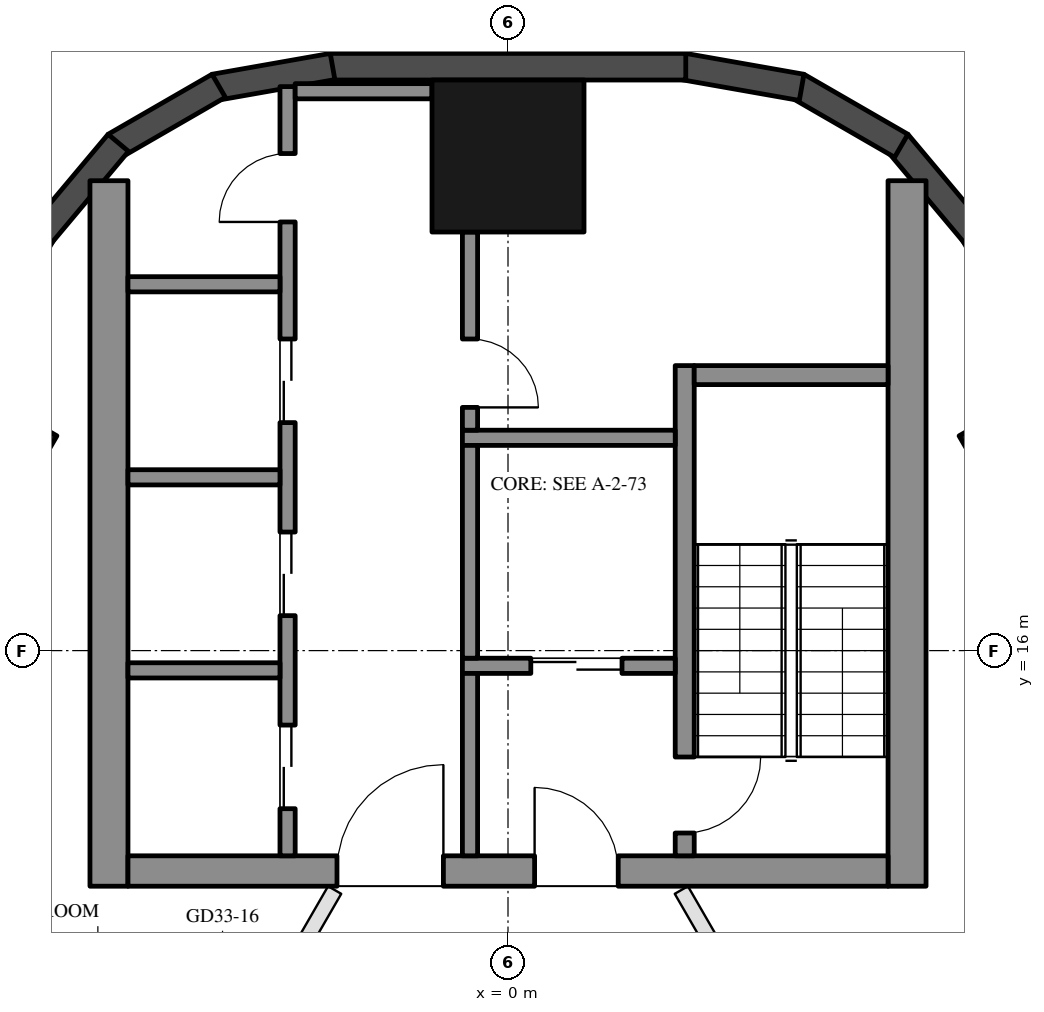
"""IFC4 building model, lengths in metres.
Left out: names, types, materials, properties, quantities, classifications, styles, units other than length and angle.
Written with IfcOpenShell. Run it as: python <this file> out.ifc"""

import sys

from ifc_helpers import new_model, si_unit, direction, frame, frame_2d, origin, origin_2d, place, context, subcontext, project, spatial, rectangle, hollow_rectangle, extrude, boolean, halfspace, element, fill, save


model = new_model("IFC4")
c1 = context("Model", 3, precision=1e-05, world=origin(), true_north=direction((0.0, 1.0)))
c2 = subcontext(c1, "Body", "Model", "MODEL_VIEW")
j1 = project(units=[si_unit("LENGTHUNIT", "METRE"), si_unit("PLANEANGLEUNIT", "RADIAN")], contexts=[c1])
p1 = place(None, origin())
s1 = spatial("IfcSite", under=j1, at=p1, CompositionType="ELEMENT")
p2 = place(p1, origin())
s2 = spatial("IfcBuilding", under=s1, at=p2, CompositionType="ELEMENT")
p3 = place(p2, frame((0.0, 0.0, 313.3)))
s3 = spatial("IfcBuildingStorey", under=s2, at=p3, CompositionType="ELEMENT", Elevation=313.3)
for number, where, z_axis, x_axis in (
    (1, (6.31, 18.725, 0.0), (0.0, 0.0, 1.0), (-0.5, 0.866, 0.0)),
    (2, (-6.31, 18.725, 0.0), (0.0, 0.0, 1.0), (0.5, 0.866, 0.0)),
):
    element("IfcColumn", number, at=place(p3, frame(where, z_axis=z_axis, x_axis=x_axis)), inside=s3, PredefinedType="COLUMN", context=c2, shape_type="SweptSolid", body=[
        boolean("DIFFERENCE", extrude(hollow_rectangle(XDim=0.55, YDim=0.55, WallThickness=0.025, at=origin_2d()), origin(), (0.0, 0.0, 1.0), 3.7), halfspace(frame((0.0, 0.0, 0.04), z_axis=(0.0, 0.0, 1.0), x_axis=(1.0, 0.0, 0.0)), True)),
    ])
p4 = place(p3, frame((0.0, 22.508, 0.0), z_axis=(0.0, 0.0, 1.0), x_axis=(1.0, 0.0, 0.0)))
e3 = element("IfcColumn", 3, at=p4, inside=s3, PredefinedType="COLUMN", context=c2, shape_type="SweptSolid", body=[
    boolean("DIFFERENCE", extrude(hollow_rectangle(XDim=2.0, YDim=2.0, WallThickness=0.05, at=origin_2d()), origin(), (0.0, 0.0, 1.0), 3.7), halfspace(frame((0.0, 0.0, 0.113), z_axis=(0.0, 0.0, 1.0), x_axis=(1.0, 0.0, 0.0)), True)),
])
p5 = place(p3, frame((-6.125, 21.497, 0.0), z_axis=(0.0, 0.0, 1.0), x_axis=(-0.500002137087, -0.866024169933, 0.0)))
e4 = element("IfcWall", 4, at=p5, inside=s3, PredefinedType="SOLIDWALL", context=c2, shape_type="SweptSolid", body=[
    extrude(rectangle(XDim=9.924, YDim=0.35, at=frame_2d((4.962, 0.0))), origin(), (0.0, 0.0, 1.0), 3.55),
])
p6 = place(p5, frame((0.381, 0.0, 0.3)))
e5 = element("IfcOpeningElement", 5, at=p6, cuts=e4, PredefinedType="OPENING", context=c2, shape_type="SweptSolid", body=[
    extrude(rectangle(XDim=1.4, YDim=2.65, at=frame_2d((0.7, 1.325))), frame((0.0, 0.185, 0.0), z_axis=(0.0, -1.0, 0.0), x_axis=(1.0, 0.0, 0.0)), (0.0, 0.0, 1.0), 0.37),
])
p7 = place(p5, frame((5.999, 0.0, 0.0)))
e6 = element("IfcOpeningElement", 6, at=p7, cuts=e4, PredefinedType="OPENING", context=c2, shape_type="SweptSolid", body=[
    extrude(rectangle(XDim=2.4, YDim=2.4, at=frame_2d((1.2, 1.2))), frame((0.0, 0.185, 0.0), z_axis=(0.0, -1.0, 0.0), x_axis=(1.0, 0.0, 0.0)), (0.0, 0.0, 1.0), 0.37),
])
p8 = place(p5, frame((3.118, 0.0, 0.3)))
e7 = element("IfcOpeningElement", 7, at=p8, cuts=e4, PredefinedType="OPENING", context=c2, shape_type="SweptSolid", body=[
    extrude(rectangle(XDim=2.5, YDim=2.65, at=frame_2d((1.25, 1.325))), frame((0.0, 0.185, 0.0), z_axis=(0.0, -1.0, 0.0), x_axis=(1.0, 0.0, 0.0)), (0.0, 0.0, 1.0), 0.37),
])
p9 = place(p3, frame((7.821, 18.558, 0.0), z_axis=(0.0, 0.0, 1.0), x_axis=(-0.500000656212, 0.86602502492, 0.0)))
e8 = element("IfcWall", 8, at=p9, inside=s3, PredefinedType="SOLIDWALL", context=c2, shape_type="SweptSolid", body=[
    extrude(rectangle(XDim=3.393, YDim=0.35, at=frame_2d((1.697, 0.0))), origin(), (0.0, 0.0, 1.0), 3.55),
])
p10 = place(p9, frame((1.525, 0.0, 0.3)))
e9 = element("IfcOpeningElement", 9, at=p10, cuts=e8, PredefinedType="OPENING", context=c2, shape_type="SweptSolid", body=[
    extrude(rectangle(XDim=1.4, YDim=2.65, at=frame_2d((0.7, 1.325))), frame((0.0, 0.185, 0.0), z_axis=(0.0, -1.0, 0.0), x_axis=(1.0, 0.0, 0.0)), (0.0, 0.0, 1.0), 0.37),
])
for number, where, z_axis, x_axis in (
    (10, (6.142, 21.472, 0.0), (0.0, 0.0, 1.0), (-0.643, 0.766, 0.0)),
    (11, (5.174, 22.642, 0.0), (0.0, 0.0, 1.0), (-0.866, 0.5, 0.0)),
):
    element("IfcWall", number, at=place(p3, frame(where, z_axis=z_axis, x_axis=x_axis)), inside=s3, PredefinedType="SOLIDWALL", context=c2, shape_type="SweptSolid", body=[
        extrude(rectangle(XDim=1.579, YDim=0.35, at=frame_2d((0.79, 0.0))), origin(), (0.0, 0.0, 1.0), 3.55),
    ])
p11 = place(p3, frame((3.863, 23.411, 0.0), z_axis=(0.0, 0.0, 1.0), x_axis=(-0.98478200219, 0.173794154571, 0.0)))
e12 = element("IfcWall", 12, at=p11, inside=s3, PredefinedType="SOLIDWALL", context=c2, shape_type="SweptSolid", body=[
    extrude(rectangle(XDim=1.579, YDim=0.35, at=frame_2d((0.79, 0.0))), origin(), (0.0, 0.0, 1.0), 3.55),
])
p12 = place(p3, frame((2.339, 23.683, 0.0), z_axis=(0.0, 0.0, 1.0), x_axis=(-1.0, 0.0, 0.0)))
e13 = element("IfcWall", 13, at=p12, inside=s3, PredefinedType="SOLIDWALL", context=c2, shape_type="SweptSolid", body=[
    extrude(rectangle(XDim=4.677, YDim=0.35, at=frame_2d((2.339, 0.0))), origin(), (0.0, 0.0, 1.0), 3.55),
])
p13 = place(p3, frame((-2.308, 23.685, 0.0), z_axis=(0.0, 0.0, 1.0), x_axis=(-0.98478200219, -0.173794154571, 0.0)))
e14 = element("IfcWall", 14, at=p13, inside=s3, PredefinedType="SOLIDWALL", context=c2, shape_type="SweptSolid", body=[
    extrude(rectangle(XDim=1.579, YDim=0.35, at=frame_2d((0.79, 0.0))), origin(), (0.0, 0.0, 1.0), 3.55),
])
for number, where, z_axis, x_axis in (
    (15, (-3.806, 23.432, 0.0), (0.0, 0.0, 1.0), (-0.866, -0.5, 0.0)),
    (16, (-5.127, 22.681, 0.0), (0.0, 0.0, 1.0), (-0.643, -0.766, 0.0)),
):
    element("IfcWall", number, at=place(p3, frame(where, z_axis=z_axis, x_axis=x_axis)), inside=s3, PredefinedType="SOLIDWALL", context=c2, shape_type="SweptSolid", body=[
        extrude(rectangle(XDim=1.579, YDim=0.35, at=frame_2d((0.79, 0.0))), origin(), (0.0, 0.0, 1.0), 3.55),
    ])
for number, where, z_axis, x_axis in (
    (17, (5.25, 12.9, 0.0), (0.0, 0.0, 1.0), (0.0, 1.0, 0.0)),
    (18, (-5.25, 12.9, 0.0), (0.0, 0.0, 1.0), (0.0, 1.0, 0.0)),
):
    element("IfcWall", number, at=place(p3, frame(where, z_axis=z_axis, x_axis=x_axis)), inside=s3, PredefinedType="SHEAR", context=c2, shape_type="SweptSolid", body=[
        extrude(rectangle(XDim=9.283, YDim=0.5, at=frame_2d((4.641, 0.0))), origin(), (0.0, 0.0, 1.0), 3.5),
    ])
p14 = place(p3, frame((5.0, 13.1, 0.0), z_axis=(0.0, 0.0, 1.0), x_axis=(-1.0, 0.0, 0.0)))
e19 = element("IfcWall", 19, at=p14, inside=s3, PredefinedType="SHEAR", context=c2, shape_type="SweptSolid", body=[
    extrude(rectangle(XDim=10.0, YDim=0.4, at=frame_2d((5.0, 0.0))), origin(), (0.0, 0.0, 1.0), 3.5),
])
p15 = place(p14, frame((3.55, 0.0, 0.0)))
e20 = element("IfcOpeningElement", 20, at=p15, cuts=e19, PredefinedType="OPENING", context=c2, shape_type="SweptSolid", body=[
    extrude(rectangle(XDim=1.1, YDim=2.1, at=frame_2d((0.55, 1.05))), frame((0.0, 0.21, 0.0), z_axis=(0.0, -1.0, 0.0), x_axis=(1.0, 0.0, 0.0)), (0.0, 0.0, 1.0), 0.42),
])
p16 = place(p14, frame((5.85, 0.0, 0.0)))
e21 = element("IfcOpeningElement", 21, at=p16, cuts=e19, PredefinedType="OPENING", context=c2, shape_type="SweptSolid", body=[
    extrude(rectangle(XDim=1.4, YDim=2.1, at=frame_2d((0.7, 1.05))), frame((0.0, 0.21, 0.0), z_axis=(0.0, -1.0, 0.0), x_axis=(1.0, 0.0, 0.0)), (0.0, 0.0, 1.0), 0.42),
])
p17 = place(p3, frame((2.325, 13.3, 0.0), z_axis=(0.0, 0.0, 1.0), x_axis=(0.0, 1.0, 0.0)))
e22 = element("IfcWall", 22, at=p17, inside=s3, PredefinedType="SHEAR", context=c2, shape_type="SweptSolid", body=[
    extrude(rectangle(XDim=6.45, YDim=0.25, at=frame_2d((3.225, 0.0))), origin(), (0.0, 0.0, 1.0), 3.5),
])
p18 = place(p17, frame((0.3, 0.0, 0.0)))
e23 = element("IfcOpeningElement", 23, at=p18, cuts=e22, PredefinedType="OPENING", context=c2, shape_type="SweptSolid", body=[
    extrude(rectangle(XDim=1.0, YDim=2.1, at=frame_2d((0.5, 1.05))), frame((0.0, 0.135, 0.0), z_axis=(0.0, -1.0, 0.0), x_axis=(1.0, 0.0, 0.0)), (0.0, 0.0, 1.0), 0.27),
])
p19 = place(p3, frame((5.0, 19.625, 0.0), z_axis=(0.0, 0.0, 1.0), x_axis=(-1.0, 0.0, 0.0)))
e24 = element("IfcWall", 24, at=p19, inside=s3, PredefinedType="SHEAR", context=c2, shape_type="SweptSolid", body=[
    extrude(rectangle(XDim=2.55, YDim=0.25, at=frame_2d((1.275, 0.0))), origin(), (0.0, 0.0, 1.0), 3.5),
])
p20 = place(p3, frame((2.2, 18.8, 0.0), z_axis=(0.0, 0.0, 1.0), x_axis=(-1.0, 0.0, 0.0)))
e25 = element("IfcWall", 25, at=p20, inside=s3, PredefinedType="SHEAR", context=c2, shape_type="SweptSolid", body=[
    extrude(rectangle(XDim=2.8, YDim=0.2, at=frame_2d((1.4, 0.0))), origin(), (0.0, 0.0, 1.0), 3.5),
])
p21 = place(p3, frame((2.2, 15.8, 0.0), z_axis=(0.0, 0.0, 1.0), x_axis=(-1.0, 0.0, 0.0)))
e26 = element("IfcWall", 26, at=p21, inside=s3, PredefinedType="SHEAR", context=c2, shape_type="SweptSolid", body=[
    extrude(rectangle(XDim=2.8, YDim=0.2, at=frame_2d((1.4, 0.0))), origin(), (0.0, 0.0, 1.0), 3.5),
])
p22 = place(p21, frame((0.7, 0.0, 0.0)))
e27 = element("IfcOpeningElement", 27, at=p22, cuts=e26, PredefinedType="OPENING", context=c2, shape_type="SweptSolid", body=[
    extrude(rectangle(XDim=1.2, YDim=2.1, at=frame_2d((0.6, 1.05))), frame((0.0, 0.11, 0.0), z_axis=(0.0, -1.0, 0.0), x_axis=(1.0, 0.0, 0.0)), (0.0, 0.0, 1.0), 0.22),
])
p23 = place(p3, frame((-0.5, 15.9, 0.0), z_axis=(0.0, 0.0, 1.0), x_axis=(0.0, 1.0, 0.0)))
e28 = element("IfcWall", 28, at=p23, inside=s3, PredefinedType="SHEAR", context=c2, shape_type="SweptSolid", body=[
    extrude(rectangle(XDim=2.8, YDim=0.2, at=frame_2d((1.4, 0.0))), origin(), (0.0, 0.0, 1.0), 3.5),
])
p24 = place(p3, frame((-0.5, 13.3, 0.0), z_axis=(0.0, 0.0, 1.0), x_axis=(0.0, 1.0, 0.0)))
e29 = element("IfcWall", 29, at=p24, inside=s3, PredefinedType="SHEAR", context=c2, shape_type="SweptSolid", body=[
    extrude(rectangle(XDim=2.4, YDim=0.2, at=frame_2d((1.2, 0.0))), origin(), (0.0, 0.0, 1.0), 3.5),
])
p25 = place(p3, frame((-2.9, 13.3, 0.0), z_axis=(0.0, 0.0, 1.0), x_axis=(0.0, 1.0, 0.0)))
e30 = element("IfcWall", 30, at=p25, inside=s3, PredefinedType="SHEAR", context=c2, shape_type="SweptSolid", body=[
    extrude(rectangle(XDim=10.121, YDim=0.2, at=frame_2d((5.061, 0.0))), origin(), (0.0, 0.0, 1.0), 3.5),
])
p26 = place(p25, frame((0.62, 0.0, 0.0)))
e31 = element("IfcOpeningElement", 31, at=p26, cuts=e30, PredefinedType="OPENING", context=c2, shape_type="SweptSolid", body=[
    extrude(rectangle(XDim=1.1, YDim=2.1, at=frame_2d((0.55, 1.05))), frame((0.0, 0.11, 0.0), z_axis=(0.0, -1.0, 0.0), x_axis=(1.0, 0.0, 0.0)), (0.0, 0.0, 1.0), 0.22),
])
p27 = place(p25, frame((3.16, 0.0, 0.0)))
e32 = element("IfcOpeningElement", 32, at=p27, cuts=e30, PredefinedType="OPENING", context=c2, shape_type="SweptSolid", body=[
    extrude(rectangle(XDim=1.1, YDim=2.1, at=frame_2d((0.55, 1.05))), frame((0.0, 0.11, 0.0), z_axis=(0.0, -1.0, 0.0), x_axis=(1.0, 0.0, 0.0)), (0.0, 0.0, 1.0), 0.22),
])
p28 = place(p25, frame((5.7, 0.0, 0.0)))
e33 = element("IfcOpeningElement", 33, at=p28, cuts=e30, PredefinedType="OPENING", context=c2, shape_type="SweptSolid", body=[
    extrude(rectangle(XDim=1.1, YDim=2.1, at=frame_2d((0.55, 1.05))), frame((0.0, 0.11, 0.0), z_axis=(0.0, -1.0, 0.0), x_axis=(1.0, 0.0, 0.0)), (0.0, 0.0, 1.0), 0.22),
])
p29 = place(p25, frame((8.34, 0.0, 0.0)))
e34 = element("IfcOpeningElement", 34, at=p29, cuts=e30, PredefinedType="OPENING", context=c2, shape_type="SweptSolid", body=[
    extrude(rectangle(XDim=0.9, YDim=2.1, at=frame_2d((0.45, 1.05))), frame((0.0, 0.11, 0.0), z_axis=(0.0, -1.0, 0.0), x_axis=(1.0, 0.0, 0.0)), (0.0, 0.0, 1.0), 0.22),
])
p30 = place(p3, frame((-1.0, 23.36, 0.0), z_axis=(0.0, 0.0, 1.0), x_axis=(-1.0, 0.0, 0.0)))
e35 = element("IfcWall", 35, at=p30, inside=s3, PredefinedType="SHEAR", context=c2, shape_type="SweptSolid", body=[
    extrude(rectangle(XDim=1.8, YDim=0.2, at=frame_2d((0.9, 0.0))), origin(), (0.0, 0.0, 1.0), 3.5),
])
p31 = place(p3, frame((-0.5, 18.9, 0.0), z_axis=(0.0, 0.0, 1.0), x_axis=(0.0, 1.0, 0.0)))
e36 = element("IfcWall", 36, at=p31, inside=s3, PredefinedType="SHEAR", context=c2, shape_type="SweptSolid", body=[
    extrude(rectangle(XDim=2.608, YDim=0.2, at=frame_2d((1.304, 0.0))), origin(), (0.0, 0.0, 1.0), 3.5),
])
p32 = place(p31, frame((0.3, 0.0, 0.0)))
e37 = element("IfcOpeningElement", 37, at=p32, cuts=e36, PredefinedType="OPENING", context=c2, shape_type="SweptSolid", body=[
    extrude(rectangle(XDim=0.9, YDim=2.1, at=frame_2d((0.45, 1.05))), frame((0.0, 0.11, 0.0), z_axis=(0.0, -1.0, 0.0), x_axis=(1.0, 0.0, 0.0)), (0.0, 0.0, 1.0), 0.22),
])
for number, where, z_axis, x_axis in (
    (38, (-3.0, 15.74, 0.0), (0.0, 0.0, 1.0), (-1.0, 0.0, 0.0)),
    (39, (-3.0, 18.28, 0.0), (0.0, 0.0, 1.0), (-1.0, 0.0, 0.0)),
    (40, (-3.0, 20.82, 0.0), (0.0, 0.0, 1.0), (-1.0, 0.0, 0.0)),
):
    element("IfcWall", number, at=place(p3, frame(where, z_axis=z_axis, x_axis=x_axis)), inside=s3, PredefinedType="SHEAR", context=c2, shape_type="SweptSolid", body=[
        extrude(rectangle(XDim=2.0, YDim=0.2, at=frame_2d((1.0, 0.0))), origin(), (0.0, 0.0, 1.0), 3.5),
    ])
p33 = place(p3, frame((2.281, 12.85, 0.0), z_axis=(0.0, 0.0, 1.0), x_axis=(0.500004836318, -0.866022611517, 0.0)))
e41 = element("IfcWall", 41, at=p33, inside=s3, PredefinedType="PARTITIONING", context=c2, shape_type="SweptSolid", body=[
    extrude(rectangle(XDim=5.488, YDim=0.2, at=frame_2d((2.744, 0.0))), origin(), (0.0, 0.0, 1.0), 3.1),
])
p34 = place(p33, frame((2.038, 0.0, 0.0)))
e42 = element("IfcOpeningElement", 42, at=p34, cuts=e41, PredefinedType="OPENING", context=c2, shape_type="SweptSolid", body=[
    extrude(rectangle(XDim=1.0, YDim=2.1, at=frame_2d((0.5, 1.05))), frame((0.0, 0.11, 0.0), z_axis=(0.0, -1.0, 0.0), x_axis=(1.0, 0.0, 0.0)), (0.0, 0.0, 1.0), 0.22),
])
p35 = place(p3, frame((-4.625, 8.79, 0.0), z_axis=(0.0, 0.0, 1.0), x_axis=(0.499964368059, 0.866045974918, 0.0)))
e43 = element("IfcWall", 43, at=p35, inside=s3, PredefinedType="PARTITIONING", context=c2, shape_type="SweptSolid", body=[
    extrude(rectangle(XDim=4.688, YDim=0.2, at=frame_2d((2.344, 0.0))), origin(), (0.0, 0.0, 1.0), 3.1),
])
p36 = place(p35, frame((2.45, 0.0, 0.0)))
e44 = element("IfcOpeningElement", 44, at=p36, cuts=e43, PredefinedType="OPENING", context=c2, shape_type="SweptSolid", body=[
    extrude(rectangle(XDim=1.0, YDim=2.1, at=frame_2d((0.5, 1.05))), frame((0.0, 0.11, 0.0), z_axis=(0.0, -1.0, 0.0), x_axis=(1.0, 0.0, 0.0)), (0.0, 0.0, 1.0), 0.22),
])
p37 = place(p22, origin())
e45 = element("IfcDoor", 45, at=p37, inside=s3, OperationType="DOUBLE_DOOR_SLIDING", PredefinedType="DOOR", context=c2, shape_type="SweptSolid", body=[
    extrude(rectangle(XDim=1.2, YDim=2.1, at=frame_2d((0.6, 1.05))), frame((0.0, 0.025, 0.0), z_axis=(0.0, -1.0, 0.0), x_axis=(1.0, 0.0, 0.0)), (0.0, 0.0, 1.0), 0.05),
])
fill(e27, e45)
p38 = place(p26, origin())
e46 = element("IfcDoor", 46, at=p38, inside=s3, OperationType="DOUBLE_DOOR_SLIDING", PredefinedType="DOOR", context=c2, shape_type="SweptSolid", body=[
    extrude(rectangle(XDim=1.1, YDim=2.1, at=frame_2d((0.55, 1.05))), frame((0.0, 0.025, 0.0), z_axis=(0.0, -1.0, 0.0), x_axis=(1.0, 0.0, 0.0)), (0.0, 0.0, 1.0), 0.05),
])
fill(e31, e46)
p39 = place(p27, origin())
e47 = element("IfcDoor", 47, at=p39, inside=s3, OperationType="DOUBLE_DOOR_SLIDING", PredefinedType="DOOR", context=c2, shape_type="SweptSolid", body=[
    extrude(rectangle(XDim=1.1, YDim=2.1, at=frame_2d((0.55, 1.05))), frame((0.0, 0.025, 0.0), z_axis=(0.0, -1.0, 0.0), x_axis=(1.0, 0.0, 0.0)), (0.0, 0.0, 1.0), 0.05),
])
fill(e32, e47)
p40 = place(p28, origin())
e48 = element("IfcDoor", 48, at=p40, inside=s3, OperationType="DOUBLE_DOOR_SLIDING", PredefinedType="DOOR", context=c2, shape_type="SweptSolid", body=[
    extrude(rectangle(XDim=1.1, YDim=2.1, at=frame_2d((0.55, 1.05))), frame((0.0, 0.025, 0.0), z_axis=(0.0, -1.0, 0.0), x_axis=(1.0, 0.0, 0.0)), (0.0, 0.0, 1.0), 0.05),
])
fill(e33, e48)
p41 = place(p29, origin())
e49 = element("IfcDoor", 49, at=p41, inside=s3, OperationType="SINGLE_SWING_LEFT", PredefinedType="DOOR", context=c2, shape_type="SweptSolid", body=[
    extrude(rectangle(XDim=0.9, YDim=2.1, at=frame_2d((0.45, 1.05))), frame((0.0, 0.025, 0.0), z_axis=(0.0, -1.0, 0.0), x_axis=(1.0, 0.0, 0.0)), (0.0, 0.0, 1.0), 0.05),
])
fill(e34, e49)
p42 = place(p32, frame((0.9, 0.0, 0.0), z_axis=(0.0, 0.0, 1.0), x_axis=(-1.0, 0.0, 0.0)))
e50 = element("IfcDoor", 50, at=p42, inside=s3, OperationType="SINGLE_SWING_RIGHT", PredefinedType="DOOR", context=c2, shape_type="SweptSolid", body=[
    extrude(rectangle(XDim=0.9, YDim=2.1, at=frame_2d((0.45, 1.05))), frame((0.0, 0.025, 0.0), z_axis=(0.0, -1.0, 0.0), x_axis=(1.0, 0.0, 0.0)), (0.0, 0.0, 1.0), 0.05),
])
fill(e37, e50)
p43 = place(p15, frame((1.1, 0.0, 0.0), z_axis=(0.0, 0.0, 1.0), x_axis=(-1.0, 0.0, 0.0)))
e51 = element("IfcDoor", 51, at=p43, inside=s3, OperationType="SINGLE_SWING_LEFT", PredefinedType="DOOR", context=c2, shape_type="SweptSolid", body=[
    extrude(rectangle(XDim=1.1, YDim=2.1, at=frame_2d((0.55, 1.05))), frame((0.0, 0.025, 0.0), z_axis=(0.0, -1.0, 0.0), x_axis=(1.0, 0.0, 0.0)), (0.0, 0.0, 1.0), 0.05),
])
fill(e20, e51)
p44 = place(p16, frame((1.4, 0.0, 0.0), z_axis=(0.0, 0.0, 1.0), x_axis=(-1.0, 0.0, 0.0)))
e52 = element("IfcDoor", 52, at=p44, inside=s3, OperationType="DOUBLE_DOOR_SINGLE_SWING", PredefinedType="DOOR", context=c2, shape_type="SweptSolid", body=[
    extrude(rectangle(XDim=1.4, YDim=2.1, at=frame_2d((0.7, 1.05))), frame((0.0, 0.025, 0.0), z_axis=(0.0, -1.0, 0.0), x_axis=(1.0, 0.0, 0.0)), (0.0, 0.0, 1.0), 0.05),
])
fill(e21, e52)
p45 = place(p18, frame((1.0, 0.0, 0.0), z_axis=(0.0, 0.0, 1.0), x_axis=(-1.0, 0.0, 0.0)))
e53 = element("IfcDoor", 53, at=p45, inside=s3, OperationType="SINGLE_SWING_LEFT", PredefinedType="DOOR", context=c2, shape_type="SweptSolid", body=[
    extrude(rectangle(XDim=1.0, YDim=2.1, at=frame_2d((0.5, 1.05))), frame((0.0, 0.025, 0.0), z_axis=(0.0, -1.0, 0.0), x_axis=(1.0, 0.0, 0.0)), (0.0, 0.0, 1.0), 0.05),
])
fill(e23, e53)
save(model, sys.argv[1])
